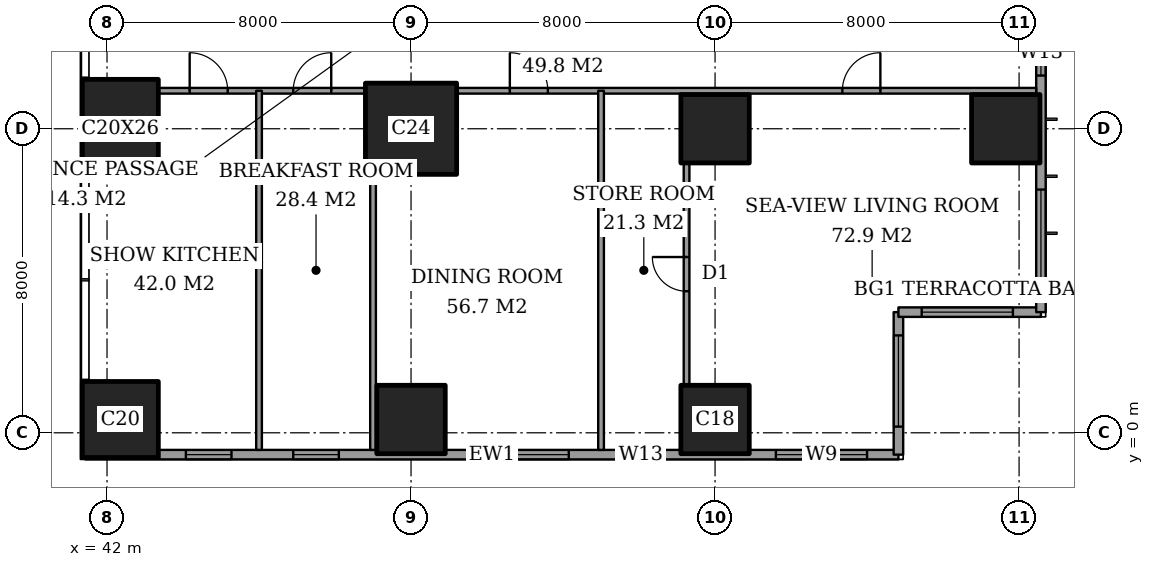
"""IFC4 building model, lengths in metres.
Left out: names, types, materials, properties, quantities, classifications, styles, units other than length and angle.
Written with IfcOpenShell. Run it as: python <this file> out.ifc"""

import sys

from ifc_helpers import new_model, si_unit, direction, frame, frame_2d, origin, origin_2d, place, context, subcontext, project, spatial, rectangle, extrude, element, fill, save


model = new_model("IFC4")
c1 = context("Model", 3, precision=1e-05, world=origin(), true_north=direction((0.0, 1.0)))
c2 = subcontext(c1, "Body", "Model", "MODEL_VIEW")
j1 = project(units=[si_unit("LENGTHUNIT", "METRE"), si_unit("PLANEANGLEUNIT", "RADIAN")], contexts=[c1])
p1 = place(None, origin())
s1 = spatial("IfcSite", under=j1, at=p1, CompositionType="ELEMENT")
p2 = place(p1, origin())
s2 = spatial("IfcBuilding", under=s1, at=p2, CompositionType="ELEMENT")
p3 = place(p2, frame((0.0, 0.0, 211.0)))
s3 = spatial("IfcBuildingStorey", under=s2, at=p3, CompositionType="ELEMENT", Elevation=211.0)
p4 = place(p3, frame((42.35, 0.35, 0.0), z_axis=(0.0, 0.0, 1.0), x_axis=(1.0, 0.0, 0.0)))
e1 = element("IfcColumn", 1, at=p4, inside=s3, PredefinedType="COLUMN", context=c2, shape_type="SweptSolid", body=[
    extrude(rectangle(XDim=2.0, YDim=2.0, at=origin_2d()), origin(), (0.0, 0.0, 1.0), 3.6),
])
p5 = place(p3, frame((42.35, 8.0, 0.0), z_axis=(0.0, 0.0, 1.0), x_axis=(1.0, 0.0, 0.0)))
e2 = element("IfcColumn", 2, at=p5, inside=s3, PredefinedType="COLUMN", context=c2, shape_type="SweptSolid", body=[
    extrude(rectangle(XDim=2.0, YDim=2.6, at=origin_2d()), origin(), (0.0, 0.0, 1.0), 3.6),
])
p6 = place(p3, frame((50.0, 0.35, 0.0), z_axis=(0.0, 0.0, 1.0), x_axis=(1.0, 0.0, 0.0)))
e3 = element("IfcColumn", 3, at=p6, inside=s3, PredefinedType="COLUMN", context=c2, shape_type="SweptSolid", body=[
    extrude(rectangle(XDim=1.8, YDim=1.8, at=origin_2d()), origin(), (0.0, 0.0, 1.0), 3.6),
])
p7 = place(p3, frame((50.0, 8.0, 0.0), z_axis=(0.0, 0.0, 1.0), x_axis=(1.0, 0.0, 0.0)))
e4 = element("IfcColumn", 4, at=p7, inside=s3, PredefinedType="COLUMN", context=c2, shape_type="SweptSolid", body=[
    extrude(rectangle(XDim=2.4, YDim=2.4, at=origin_2d()), origin(), (0.0, 0.0, 1.0), 3.6),
])
for number, where, z_axis, x_axis in (
    (5, (58.0, 0.35, 0.0), (0.0, 0.0, 1.0), (1.0, 0.0, 0.0)),
    (6, (58.0, 8.0, 0.0), (0.0, 0.0, 1.0), (1.0, 0.0, 0.0)),
    (7, (65.65, 8.0, 0.0), (0.0, 0.0, 1.0), (1.0, 0.0, 0.0)),
):
    element("IfcColumn", number, at=place(p3, frame(where, z_axis=z_axis, x_axis=x_axis)), inside=s3, PredefinedType="COLUMN", context=c2, shape_type="SweptSolid", body=[
        extrude(rectangle(XDim=1.8, YDim=1.8, at=origin_2d()), origin(), (0.0, 0.0, 1.0), 3.6),
    ])
p8 = place(p3, frame((41.425, -0.575, 0.0), z_axis=(0.0, 0.0, 1.0), x_axis=(1.0, 0.0, 0.0)))
e8 = element("IfcWall", 8, at=p8, inside=s3, PredefinedType="SOLIDWALL", context=c2, shape_type="SweptSolid", body=[
    extrude(rectangle(XDim=21.4, YDim=0.25, at=frame_2d((10.7, 0.0))), origin(), (0.0, 0.0, 1.0), 3.6),
])
p9 = place(p8, frame((2.65, 0.0, 0.2)))
e9 = element("IfcOpeningElement", 9, at=p9, cuts=e8, PredefinedType="OPENING", context=c2, shape_type="SweptSolid", body=[
    extrude(rectangle(XDim=1.2, YDim=2.4, at=frame_2d((0.6, 1.2))), frame((0.0, 0.135, 0.0), z_axis=(0.0, -1.0, 0.0), x_axis=(1.0, 0.0, 0.0)), (0.0, 0.0, 1.0), 0.27),
])
p10 = place(p8, frame((5.475, 0.0, 0.2)))
e10 = element("IfcOpeningElement", 10, at=p10, cuts=e8, PredefinedType="OPENING", context=c2, shape_type="SweptSolid", body=[
    extrude(rectangle(XDim=1.2, YDim=2.4, at=frame_2d((0.6, 1.2))), frame((0.0, 0.135, 0.0), z_axis=(0.0, -1.0, 0.0), x_axis=(1.0, 0.0, 0.0)), (0.0, 0.0, 1.0), 0.27),
])
p11 = place(p8, frame((10.325, 0.0, 0.2)))
e11 = element("IfcOpeningElement", 11, at=p11, cuts=e8, PredefinedType="OPENING", context=c2, shape_type="SweptSolid", body=[
    extrude(rectangle(XDim=2.4, YDim=2.4, at=frame_2d((1.2, 1.2))), frame((0.0, 0.135, 0.0), z_axis=(0.0, -1.0, 0.0), x_axis=(1.0, 0.0, 0.0)), (0.0, 0.0, 1.0), 0.27),
])
p12 = place(p8, frame((14.025, 0.0, 0.2)))
e12 = element("IfcOpeningElement", 12, at=p12, cuts=e8, PredefinedType="OPENING", context=c2, shape_type="SweptSolid", body=[
    extrude(rectangle(XDim=1.2, YDim=2.4, at=frame_2d((0.6, 1.2))), frame((0.0, 0.135, 0.0), z_axis=(0.0, -1.0, 0.0), x_axis=(1.0, 0.0, 0.0)), (0.0, 0.0, 1.0), 0.27),
])
p13 = place(p8, frame((18.175, 0.0, 0.2)))
e13 = element("IfcOpeningElement", 13, at=p13, cuts=e8, PredefinedType="OPENING", context=c2, shape_type="SweptSolid", body=[
    extrude(rectangle(XDim=2.4, YDim=2.4, at=frame_2d((1.2, 1.2))), frame((0.0, 0.135, 0.0), z_axis=(0.0, -1.0, 0.0), x_axis=(1.0, 0.0, 0.0)), (0.0, 0.0, 1.0), 0.27),
])
p14 = place(p3, frame((62.825, -0.575, 0.0), z_axis=(0.0, 0.0, 1.0), x_axis=(0.0, 1.0, 0.0)))
e14 = element("IfcWall", 14, at=p14, inside=s3, PredefinedType="SOLIDWALL", context=c2, shape_type="SweptSolid", body=[
    extrude(rectangle(XDim=3.75, YDim=0.25, at=frame_2d((1.875, 0.0))), origin(), (0.0, 0.0, 1.0), 3.6),
])
p15 = place(p14, frame((0.738, 0.0, 0.2)))
e15 = element("IfcOpeningElement", 15, at=p15, cuts=e14, PredefinedType="OPENING", context=c2, shape_type="SweptSolid", body=[
    extrude(rectangle(XDim=2.4, YDim=2.4, at=frame_2d((1.2, 1.2))), frame((0.0, 0.135, 0.0), z_axis=(0.0, -1.0, 0.0), x_axis=(1.0, 0.0, 0.0)), (0.0, 0.0, 1.0), 0.27),
])
p16 = place(p3, frame((62.825, 3.175, 0.0), z_axis=(0.0, 0.0, 1.0), x_axis=(1.0, 0.0, 0.0)))
e16 = element("IfcWall", 16, at=p16, inside=s3, PredefinedType="SOLIDWALL", context=c2, shape_type="SweptSolid", body=[
    extrude(rectangle(XDim=3.75, YDim=0.25, at=frame_2d((1.875, 0.0))), origin(), (0.0, 0.0, 1.0), 3.6),
])
p17 = place(p16, frame((0.613, 0.0, 0.2)))
e17 = element("IfcOpeningElement", 17, at=p17, cuts=e16, PredefinedType="OPENING", context=c2, shape_type="SweptSolid", body=[
    extrude(rectangle(XDim=2.4, YDim=2.4, at=frame_2d((1.2, 1.2))), frame((0.0, 0.135, 0.0), z_axis=(0.0, -1.0, 0.0), x_axis=(1.0, 0.0, 0.0)), (0.0, 0.0, 1.0), 0.27),
])
p18 = place(p3, frame((66.575, 3.175, 0.0), z_axis=(0.0, 0.0, 1.0), x_axis=(0.0, 1.0, 0.0)))
e18 = element("IfcWall", 18, at=p18, inside=s3, PredefinedType="SOLIDWALL", context=c2, shape_type="SweptSolid", body=[
    extrude(rectangle(XDim=41.65, YDim=0.25, at=frame_2d((20.825, 0.0))), origin(), (0.0, 0.0, 1.0), 3.6),
])
p19 = place(p18, frame((0.825, 0.0, 0.2)))
e19 = element("IfcOpeningElement", 19, at=p19, cuts=e18, PredefinedType="OPENING", context=c2, shape_type="SweptSolid", body=[
    extrude(rectangle(XDim=2.4, YDim=2.4, at=frame_2d((1.2, 1.2))), frame((0.0, 0.135, 0.0), z_axis=(0.0, -1.0, 0.0), x_axis=(1.0, 0.0, 0.0)), (0.0, 0.0, 1.0), 0.27),
])
p20 = place(p18, frame((6.225, 0.0, 0.2)))
e20 = element("IfcOpeningElement", 20, at=p20, cuts=e18, PredefinedType="OPENING", context=c2, shape_type="SweptSolid", body=[
    extrude(rectangle(XDim=1.2, YDim=2.4, at=frame_2d((0.6, 1.2))), frame((0.0, 0.135, 0.0), z_axis=(0.0, -1.0, 0.0), x_axis=(1.0, 0.0, 0.0)), (0.0, 0.0, 1.0), 0.27),
])
p21 = place(p18, frame((8.675, 0.0, 0.2)))
e21 = element("IfcOpeningElement", 21, at=p21, cuts=e18, PredefinedType="OPENING", context=c2, shape_type="SweptSolid", body=[
    extrude(rectangle(XDim=2.4, YDim=2.4, at=frame_2d((1.2, 1.2))), frame((0.0, 0.135, 0.0), z_axis=(0.0, -1.0, 0.0), x_axis=(1.0, 0.0, 0.0)), (0.0, 0.0, 1.0), 0.27),
])
p22 = place(p18, frame((15.675, 0.0, 0.2)))
e22 = element("IfcOpeningElement", 22, at=p22, cuts=e18, PredefinedType="OPENING", context=c2, shape_type="SweptSolid", body=[
    extrude(rectangle(XDim=2.4, YDim=2.4, at=frame_2d((1.2, 1.2))), frame((0.0, 0.135, 0.0), z_axis=(0.0, -1.0, 0.0), x_axis=(1.0, 0.0, 0.0)), (0.0, 0.0, 1.0), 0.27),
])
p23 = place(p18, frame((23.575, 0.0, 0.2)))
e23 = element("IfcOpeningElement", 23, at=p23, cuts=e18, PredefinedType="OPENING", context=c2, shape_type="SweptSolid", body=[
    extrude(rectangle(XDim=2.4, YDim=2.4, at=frame_2d((1.2, 1.2))), frame((0.0, 0.135, 0.0), z_axis=(0.0, -1.0, 0.0), x_axis=(1.0, 0.0, 0.0)), (0.0, 0.0, 1.0), 0.27),
])
p24 = place(p18, frame((30.775, 0.0, 0.2)))
e24 = element("IfcOpeningElement", 24, at=p24, cuts=e18, PredefinedType="OPENING", context=c2, shape_type="SweptSolid", body=[
    extrude(rectangle(XDim=2.4, YDim=2.4, at=frame_2d((1.2, 1.2))), frame((0.0, 0.135, 0.0), z_axis=(0.0, -1.0, 0.0), x_axis=(1.0, 0.0, 0.0)), (0.0, 0.0, 1.0), 0.27),
])
p25 = place(p18, frame((34.55, 0.0, 0.2)))
e25 = element("IfcOpeningElement", 25, at=p25, cuts=e18, PredefinedType="OPENING", context=c2, shape_type="SweptSolid", body=[
    extrude(rectangle(XDim=1.2, YDim=2.4, at=frame_2d((0.6, 1.2))), frame((0.0, 0.135, 0.0), z_axis=(0.0, -1.0, 0.0), x_axis=(1.0, 0.0, 0.0)), (0.0, 0.0, 1.0), 0.27),
])
p26 = place(p18, frame((38.425, 0.0, 0.2)))
e26 = element("IfcOpeningElement", 26, at=p26, cuts=e18, PredefinedType="OPENING", context=c2, shape_type="SweptSolid", body=[
    extrude(rectangle(XDim=2.4, YDim=2.4, at=frame_2d((1.2, 1.2))), frame((0.0, 0.135, 0.0), z_axis=(0.0, -1.0, 0.0), x_axis=(1.0, 0.0, 0.0)), (0.0, 0.0, 1.0), 0.27),
])
p27 = place(p3, frame((43.35, 9.0, 0.0), z_axis=(0.0, 0.0, 1.0), x_axis=(1.0, 0.0, 0.0)))
e27 = element("IfcWall", 27, at=p27, inside=s3, PredefinedType="PARTITIONING", context=c2, shape_type="SweptSolid", body=[
    extrude(rectangle(XDim=5.45, YDim=0.15, at=frame_2d((2.725, 0.0))), origin(), (0.0, 0.0, 1.0), 3.35),
])
p28 = place(p27, frame((3.55, 0.0, 0.0)))
e28 = element("IfcOpeningElement", 28, at=p28, cuts=e27, PredefinedType="OPENING", context=c2, shape_type="SweptSolid", body=[
    extrude(rectangle(XDim=1.0, YDim=2.1, at=frame_2d((0.5, 1.05))), frame((0.0, 0.085, 0.0), z_axis=(0.0, -1.0, 0.0), x_axis=(1.0, 0.0, 0.0)), (0.0, 0.0, 1.0), 0.17),
])
p29 = place(p27, frame((0.825, 0.0, 0.0)))
e29 = element("IfcOpeningElement", 29, at=p29, cuts=e27, PredefinedType="OPENING", context=c2, shape_type="SweptSolid", body=[
    extrude(rectangle(XDim=1.0, YDim=2.1, at=frame_2d((0.5, 1.05))), frame((0.0, 0.085, 0.0), z_axis=(0.0, -1.0, 0.0), x_axis=(1.0, 0.0, 0.0)), (0.0, 0.0, 1.0), 0.17),
])
p30 = place(p3, frame((51.2, 9.0, 0.0), z_axis=(0.0, 0.0, 1.0), x_axis=(1.0, 0.0, 0.0)))
e30 = element("IfcWall", 30, at=p30, inside=s3, PredefinedType="PARTITIONING", context=c2, shape_type="SweptSolid", body=[
    extrude(rectangle(XDim=15.25, YDim=0.15, at=frame_2d((7.625, 0.0))), origin(), (0.0, 0.0, 1.0), 3.35),
])
p31 = place(p30, frame((10.15, 0.0, 0.0)))
e31 = element("IfcOpeningElement", 31, at=p31, cuts=e30, PredefinedType="OPENING", context=c2, shape_type="SweptSolid", body=[
    extrude(rectangle(XDim=1.0, YDim=2.1, at=frame_2d((0.5, 1.05))), frame((0.0, 0.085, 0.0), z_axis=(0.0, -1.0, 0.0), x_axis=(1.0, 0.0, 0.0)), (0.0, 0.0, 1.0), 0.17),
])
p32 = place(p30, frame((1.4, 0.0, 0.0)))
e32 = element("IfcOpeningElement", 32, at=p32, cuts=e30, PredefinedType="OPENING", context=c2, shape_type="SweptSolid", body=[
    extrude(rectangle(XDim=1.0, YDim=2.1, at=frame_2d((0.5, 1.05))), frame((0.0, 0.085, 0.0), z_axis=(0.0, -1.0, 0.0), x_axis=(1.0, 0.0, 0.0)), (0.0, 0.0, 1.0), 0.17),
])
p33 = place(p3, frame((46.0, -0.45, 0.0), z_axis=(0.0, 0.0, 1.0), x_axis=(0.0, 1.0, 0.0)))
e33 = element("IfcWall", 33, at=p33, inside=s3, PredefinedType="PARTITIONING", context=c2, shape_type="SweptSolid", body=[
    extrude(rectangle(XDim=9.45, YDim=0.15, at=frame_2d((4.725, 0.0))), origin(), (0.0, 0.0, 1.0), 3.35),
])
p34 = place(p3, frame((49.0, -0.45, 0.0), z_axis=(0.0, 0.0, 1.0), x_axis=(0.0, 1.0, 0.0)))
e34 = element("IfcWall", 34, at=p34, inside=s3, PredefinedType="PARTITIONING", context=c2, shape_type="SweptSolid", body=[
    extrude(rectangle(XDim=7.25, YDim=0.15, at=frame_2d((3.625, 0.0))), origin(), (0.0, 0.0, 1.0), 3.35),
])
p35 = place(p3, frame((55.0, -0.45, 0.0), z_axis=(0.0, 0.0, 1.0), x_axis=(0.0, 1.0, 0.0)))
e35 = element("IfcWall", 35, at=p35, inside=s3, PredefinedType="PARTITIONING", context=c2, shape_type="SweptSolid", body=[
    extrude(rectangle(XDim=9.45, YDim=0.15, at=frame_2d((4.725, 0.0))), origin(), (0.0, 0.0, 1.0), 3.35),
])
p36 = place(p3, frame((57.25, 1.25, 0.0), z_axis=(0.0, 0.0, 1.0), x_axis=(0.0, 1.0, 0.0)))
e36 = element("IfcWall", 36, at=p36, inside=s3, PredefinedType="PARTITIONING", context=c2, shape_type="SweptSolid", body=[
    extrude(rectangle(XDim=5.85, YDim=0.15, at=frame_2d((2.925, 0.0))), origin(), (0.0, 0.0, 1.0), 3.35),
])
p37 = place(p36, frame((2.475, 0.0, 0.0)))
e37 = element("IfcOpeningElement", 37, at=p37, cuts=e36, PredefinedType="OPENING", context=c2, shape_type="SweptSolid", body=[
    extrude(rectangle(XDim=0.9, YDim=2.1, at=frame_2d((0.45, 1.05))), frame((0.0, 0.085, 0.0), z_axis=(0.0, -1.0, 0.0), x_axis=(1.0, 0.0, 0.0)), (0.0, 0.0, 1.0), 0.17),
])
p38 = place(p9, origin())
e38 = element("IfcWindow", 38, at=p38, inside=s3, PartitioningType="SINGLE_PANEL", PredefinedType="WINDOW", context=c2, shape_type="SweptSolid", body=[
    extrude(rectangle(XDim=1.2, YDim=2.4, at=frame_2d((0.6, 1.2))), frame((0.0, 0.03, 0.0), z_axis=(0.0, -1.0, 0.0), x_axis=(1.0, 0.0, 0.0)), (0.0, 0.0, 1.0), 0.06),
])
fill(e9, e38)
p39 = place(p10, origin())
e39 = element("IfcWindow", 39, at=p39, inside=s3, PartitioningType="SINGLE_PANEL", PredefinedType="WINDOW", context=c2, shape_type="SweptSolid", body=[
    extrude(rectangle(XDim=1.2, YDim=2.4, at=frame_2d((0.6, 1.2))), frame((0.0, 0.03, 0.0), z_axis=(0.0, -1.0, 0.0), x_axis=(1.0, 0.0, 0.0)), (0.0, 0.0, 1.0), 0.06),
])
fill(e10, e39)
p40 = place(p11, origin())
e40 = element("IfcWindow", 40, at=p40, inside=s3, PartitioningType="SINGLE_PANEL", PredefinedType="WINDOW", context=c2, shape_type="SweptSolid", body=[
    extrude(rectangle(XDim=2.4, YDim=2.4, at=frame_2d((1.2, 1.2))), frame((0.0, 0.03, 0.0), z_axis=(0.0, -1.0, 0.0), x_axis=(1.0, 0.0, 0.0)), (0.0, 0.0, 1.0), 0.06),
])
fill(e11, e40)
p41 = place(p12, origin())
e41 = element("IfcWindow", 41, at=p41, inside=s3, PartitioningType="SINGLE_PANEL", PredefinedType="WINDOW", context=c2, shape_type="SweptSolid", body=[
    extrude(rectangle(XDim=1.2, YDim=2.4, at=frame_2d((0.6, 1.2))), frame((0.0, 0.03, 0.0), z_axis=(0.0, -1.0, 0.0), x_axis=(1.0, 0.0, 0.0)), (0.0, 0.0, 1.0), 0.06),
])
fill(e12, e41)
p42 = place(p13, origin())
e42 = element("IfcWindow", 42, at=p42, inside=s3, PartitioningType="SINGLE_PANEL", PredefinedType="WINDOW", context=c2, shape_type="SweptSolid", body=[
    extrude(rectangle(XDim=2.4, YDim=2.4, at=frame_2d((1.2, 1.2))), frame((0.0, 0.03, 0.0), z_axis=(0.0, -1.0, 0.0), x_axis=(1.0, 0.0, 0.0)), (0.0, 0.0, 1.0), 0.06),
])
fill(e13, e42)
p43 = place(p15, origin())
e43 = element("IfcWindow", 43, at=p43, inside=s3, PartitioningType="SINGLE_PANEL", PredefinedType="WINDOW", context=c2, shape_type="SweptSolid", body=[
    extrude(rectangle(XDim=2.4, YDim=2.4, at=frame_2d((1.2, 1.2))), frame((0.0, 0.03, 0.0), z_axis=(0.0, -1.0, 0.0), x_axis=(1.0, 0.0, 0.0)), (0.0, 0.0, 1.0), 0.06),
])
fill(e15, e43)
p44 = place(p17, origin())
e44 = element("IfcWindow", 44, at=p44, inside=s3, PartitioningType="SINGLE_PANEL", PredefinedType="WINDOW", context=c2, shape_type="SweptSolid", body=[
    extrude(rectangle(XDim=2.4, YDim=2.4, at=frame_2d((1.2, 1.2))), frame((0.0, 0.03, 0.0), z_axis=(0.0, -1.0, 0.0), x_axis=(1.0, 0.0, 0.0)), (0.0, 0.0, 1.0), 0.06),
])
fill(e17, e44)
p45 = place(p19, origin())
e45 = element("IfcWindow", 45, at=p45, inside=s3, PartitioningType="SINGLE_PANEL", PredefinedType="WINDOW", context=c2, shape_type="SweptSolid", body=[
    extrude(rectangle(XDim=2.4, YDim=2.4, at=frame_2d((1.2, 1.2))), frame((0.0, 0.03, 0.0), z_axis=(0.0, -1.0, 0.0), x_axis=(1.0, 0.0, 0.0)), (0.0, 0.0, 1.0), 0.06),
])
fill(e19, e45)
p46 = place(p20, origin())
e46 = element("IfcWindow", 46, at=p46, inside=s3, PartitioningType="SINGLE_PANEL", PredefinedType="WINDOW", context=c2, shape_type="SweptSolid", body=[
    extrude(rectangle(XDim=1.2, YDim=2.4, at=frame_2d((0.6, 1.2))), frame((0.0, 0.03, 0.0), z_axis=(0.0, -1.0, 0.0), x_axis=(1.0, 0.0, 0.0)), (0.0, 0.0, 1.0), 0.06),
])
fill(e20, e46)
p47 = place(p31, origin())
e47 = element("IfcDoor", 47, at=p47, inside=s3, OperationType="SINGLE_SWING_LEFT", PredefinedType="DOOR", context=c2, shape_type="SweptSolid", body=[
    extrude(rectangle(XDim=1.0, YDim=2.1, at=frame_2d((0.5, 1.05))), frame((0.0, 0.025, 0.0), z_axis=(0.0, -1.0, 0.0), x_axis=(1.0, 0.0, 0.0)), (0.0, 0.0, 1.0), 0.05),
])
fill(e31, e47)
p48 = place(p37, origin())
e48 = element("IfcDoor", 48, at=p48, inside=s3, OperationType="SINGLE_SWING_LEFT", PredefinedType="DOOR", context=c2, shape_type="SweptSolid", body=[
    extrude(rectangle(XDim=0.9, YDim=2.1, at=frame_2d((0.45, 1.05))), frame((0.0, 0.025, 0.0), z_axis=(0.0, -1.0, 0.0), x_axis=(1.0, 0.0, 0.0)), (0.0, 0.0, 1.0), 0.05),
])
fill(e37, e48)
p49 = place(p32, origin())
e49 = element("IfcDoor", 49, at=p49, inside=s3, OperationType="SINGLE_SWING_RIGHT", PredefinedType="DOOR", context=c2, shape_type="SweptSolid", body=[
    extrude(rectangle(XDim=1.0, YDim=2.1, at=frame_2d((0.5, 1.05))), frame((0.0, 0.025, 0.0), z_axis=(0.0, -1.0, 0.0), x_axis=(1.0, 0.0, 0.0)), (0.0, 0.0, 1.0), 0.05),
])
fill(e32, e49)
p50 = place(p28, origin())
e50 = element("IfcDoor", 50, at=p50, inside=s3, OperationType="SINGLE_SWING_LEFT", PredefinedType="DOOR", context=c2, shape_type="SweptSolid", body=[
    extrude(rectangle(XDim=1.0, YDim=2.1, at=frame_2d((0.5, 1.05))), frame((0.0, 0.025, 0.0), z_axis=(0.0, -1.0, 0.0), x_axis=(1.0, 0.0, 0.0)), (0.0, 0.0, 1.0), 0.05),
])
fill(e28, e50)
p51 = place(p29, origin())
e51 = element("IfcDoor", 51, at=p51, inside=s3, OperationType="SINGLE_SWING_RIGHT", PredefinedType="DOOR", context=c2, shape_type="SweptSolid", body=[
    extrude(rectangle(XDim=1.0, YDim=2.1, at=frame_2d((0.5, 1.05))), frame((0.0, 0.025, 0.0), z_axis=(0.0, -1.0, 0.0), x_axis=(1.0, 0.0, 0.0)), (0.0, 0.0, 1.0), 0.05),
])
fill(e29, e51)
save(model, sys.argv[1])
